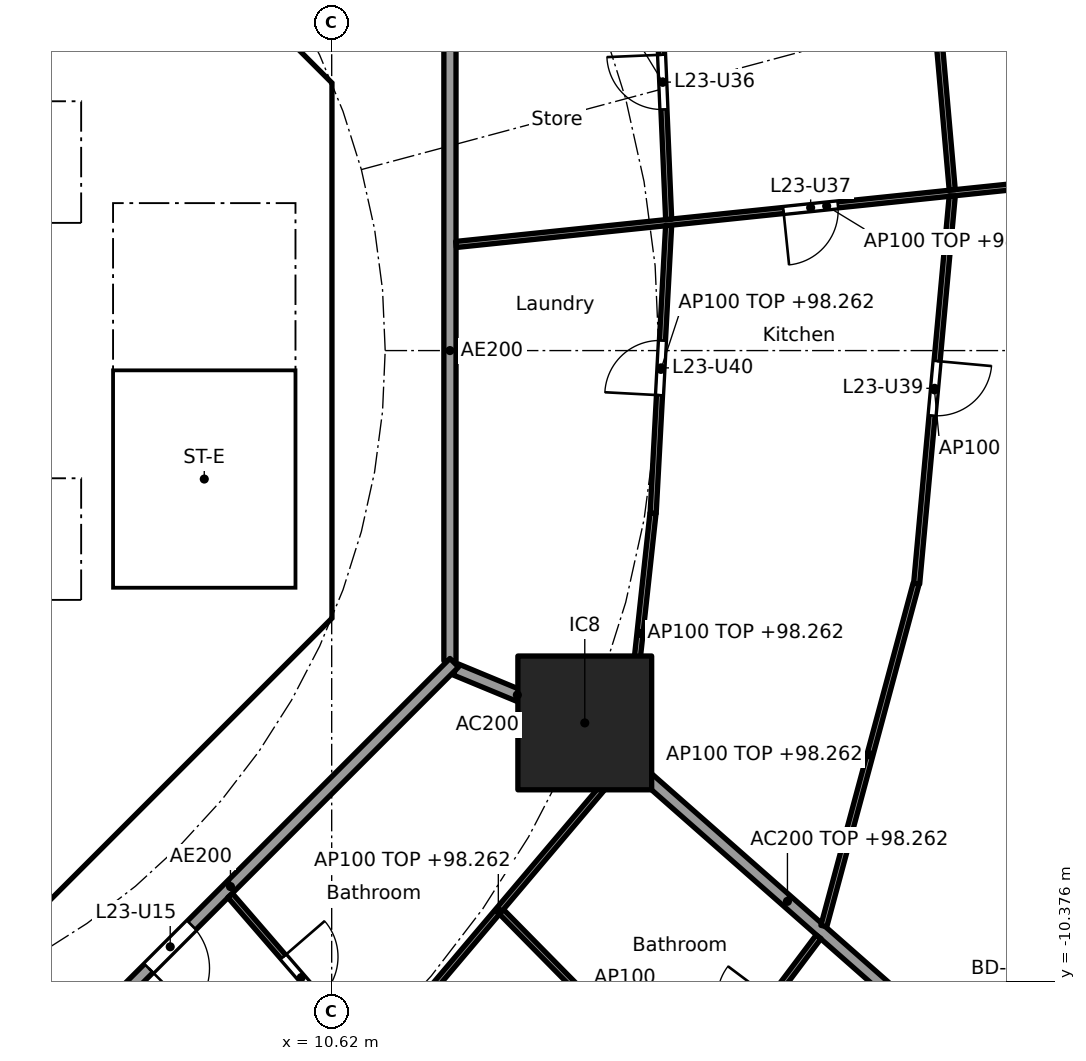
"""IFC4 building model, lengths in metres.
Left out: names, types, materials, properties, quantities, classifications, styles, units other than length and angle.
Written with IfcOpenShell. Run it as: python <this file> out.ifc"""

import sys

from ifc_helpers import new_model, si_unit, direction, frame, frame_2d, origin, origin_2d, place, context, subcontext, project, spatial, polyline, rectangle, outline, extrude, element, fill, save


model = new_model("IFC4")
c1 = context("Model", 3, precision=1e-05, world=origin(), true_north=direction((0.0, 1.0)))
c2 = subcontext(c1, "Body", "Model", "MODEL_VIEW")
j1 = project(units=[si_unit("LENGTHUNIT", "METRE"), si_unit("PLANEANGLEUNIT", "RADIAN")], contexts=[c1])
p1 = place(None, origin())
s1 = spatial("IfcSite", under=j1, at=p1, CompositionType="ELEMENT")
p2 = place(p1, origin())
s2 = spatial("IfcBuilding", under=s1, at=p2, CompositionType="ELEMENT")
p3 = place(p2, frame((0.0, 0.0, 95.5)))
s3 = spatial("IfcBuildingStorey", under=s2, at=p3, CompositionType="ELEMENT", Elevation=95.5)
p4 = place(p3, frame((14.782, -6.123, 0.0), z_axis=(0.0, 0.0, 1.0), x_axis=(1.0, 0.0, 0.0)))
e1 = element("IfcColumn", 1, at=p4, inside=s3, PredefinedType="COLUMN", context=c2, shape_type="SweptSolid", body=[
    extrude(rectangle(XDim=2.2, YDim=2.2, at=origin_2d()), origin(), (0.0, 0.0, 1.0), 3.7),
])
p5 = place(p3, frame((9.988, 4.613, 0.0), z_axis=(0.0, 0.0, 1.0), x_axis=(-0.707106781187, 0.707106781187, 0.0)))
e2 = element("IfcWall", 2, at=p5, inside=s3, PredefinedType="SHEAR", context=c2, shape_type="SweptSolid", body=[
    extrude(rectangle(XDim=7.602, YDim=0.6, at=frame_2d((3.801, 0.0))), origin(), (0.0, 0.0, 1.0), 3.44),
])
p6 = place(p5, frame((3.201, 0.0, 0.0)))
e3 = element("IfcOpeningElement", 3, at=p6, cuts=e2, PredefinedType="OPENING", context=c2, shape_type="SweptSolid", body=[
    extrude(rectangle(XDim=1.2, YDim=2.1, at=frame_2d((0.6, 1.05))), frame((0.0, 0.31, 0.0), z_axis=(0.0, -1.0, 0.0), x_axis=(1.0, 0.0, 0.0)), (0.0, 0.0, 1.0), 0.62),
])
p7 = place(p3, frame((4.613, -9.988, 0.0), z_axis=(0.0, 0.0, 1.0), x_axis=(0.707106781187, 0.707106781187, 0.0)))
e4 = element("IfcWall", 4, at=p7, inside=s3, PredefinedType="SHEAR", context=c2, shape_type="SweptSolid", body=[
    extrude(rectangle(XDim=7.602, YDim=0.6, at=frame_2d((3.801, 0.0))), origin(), (0.0, 0.0, 1.0), 3.44),
])
p8 = place(p7, frame((3.201, 0.0, 0.0)))
e5 = element("IfcOpeningElement", 5, at=p8, cuts=e4, PredefinedType="OPENING", context=c2, shape_type="SweptSolid", body=[
    extrude(rectangle(XDim=1.2, YDim=2.1, at=frame_2d((0.6, 1.05))), frame((0.0, 0.31, 0.0), z_axis=(0.0, -1.0, 0.0), x_axis=(1.0, 0.0, 0.0)), (0.0, 0.0, 1.0), 0.62),
])
p9 = place(p3, frame((-6.7, 2.0, 0.0), z_axis=(0.0, 0.0, 1.0), x_axis=(1.0, 0.0, 0.0)))
e6 = element("IfcWall", 6, at=p9, inside=s3, PredefinedType="SOLIDWALL", context=c2, shape_type="SweptSolid", body=[
    extrude(rectangle(XDim=13.4, YDim=0.2, at=frame_2d((6.7, 0.0))), origin(), (0.0, 0.0, 1.0), 3.44),
])
p10 = place(p9, frame((0.65, 0.0, 0.0)))
e7 = element("IfcOpeningElement", 7, at=p10, cuts=e6, PredefinedType="OPENING", context=c2, shape_type="SweptSolid", body=[
    extrude(rectangle(XDim=1.1, YDim=2.1, at=frame_2d((0.55, 1.05))), frame((0.0, 0.11, 0.0), z_axis=(0.0, -1.0, 0.0), x_axis=(1.0, 0.0, 0.0)), (0.0, 0.0, 1.0), 0.22),
])
p11 = place(p9, frame((2.85, 0.0, 0.0)))
e8 = element("IfcOpeningElement", 8, at=p11, cuts=e6, PredefinedType="OPENING", context=c2, shape_type="SweptSolid", body=[
    extrude(rectangle(XDim=1.1, YDim=2.1, at=frame_2d((0.55, 1.05))), frame((0.0, 0.11, 0.0), z_axis=(0.0, -1.0, 0.0), x_axis=(1.0, 0.0, 0.0)), (0.0, 0.0, 1.0), 0.22),
])
p12 = place(p9, frame((5.05, 0.0, 0.0)))
e9 = element("IfcOpeningElement", 9, at=p12, cuts=e6, PredefinedType="OPENING", context=c2, shape_type="SweptSolid", body=[
    extrude(rectangle(XDim=1.1, YDim=2.1, at=frame_2d((0.55, 1.05))), frame((0.0, 0.11, 0.0), z_axis=(0.0, -1.0, 0.0), x_axis=(1.0, 0.0, 0.0)), (0.0, 0.0, 1.0), 0.22),
])
p13 = place(p3, frame((6.7, 4.0, 0.0), z_axis=(0.0, 0.0, 1.0), x_axis=(1.0, 0.0, 0.0)))
e10 = element("IfcWall", 10, at=p13, inside=s3, PredefinedType="SOLIDWALL", context=c2, shape_type="SweptSolid", body=[
    extrude(rectangle(XDim=3.325, YDim=0.2, at=frame_2d((1.662, 0.0))), origin(), (0.0, 0.0, 1.0), 3.44),
])
p14 = place(p13, frame((1.25, 0.0, 0.0)))
e11 = element("IfcOpeningElement", 11, at=p14, cuts=e10, PredefinedType="OPENING", context=c2, shape_type="SweptSolid", body=[
    extrude(rectangle(XDim=1.1, YDim=2.1, at=frame_2d((0.55, 1.05))), frame((0.0, 0.11, 0.0), z_axis=(0.0, -1.0, 0.0), x_axis=(1.0, 0.0, 0.0)), (0.0, 0.0, 1.0), 0.22),
])
p15 = place(p3, frame((-6.7, -2.0, 0.0), z_axis=(0.0, 0.0, 1.0), x_axis=(1.0, 0.0, 0.0)))
e12 = element("IfcWall", 12, at=p15, inside=s3, PredefinedType="SOLIDWALL", context=c2, shape_type="SweptSolid", body=[
    extrude(rectangle(XDim=13.4, YDim=0.2, at=frame_2d((6.7, 0.0))), origin(), (0.0, 0.0, 1.0), 3.44),
])
p16 = place(p15, frame((0.65, 0.0, 0.0)))
e13 = element("IfcOpeningElement", 13, at=p16, cuts=e12, PredefinedType="OPENING", context=c2, shape_type="SweptSolid", body=[
    extrude(rectangle(XDim=1.1, YDim=2.1, at=frame_2d((0.55, 1.05))), frame((0.0, 0.11, 0.0), z_axis=(0.0, -1.0, 0.0), x_axis=(1.0, 0.0, 0.0)), (0.0, 0.0, 1.0), 0.22),
])
p17 = place(p15, frame((2.85, 0.0, 0.0)))
e14 = element("IfcOpeningElement", 14, at=p17, cuts=e12, PredefinedType="OPENING", context=c2, shape_type="SweptSolid", body=[
    extrude(rectangle(XDim=1.1, YDim=2.1, at=frame_2d((0.55, 1.05))), frame((0.0, 0.11, 0.0), z_axis=(0.0, -1.0, 0.0), x_axis=(1.0, 0.0, 0.0)), (0.0, 0.0, 1.0), 0.22),
])
p18 = place(p3, origin())
e15 = element("IfcWall", 15, at=p18, inside=s3, PredefinedType="SHEAR", context=c2, shape_type="SweptSolid", body=[
    extrude(outline(polyline([(9.776, -4.401), (10.025, -4.152), (10.025, -3.801), (10.025, 4.152), (9.776, 4.401), (10.2, 4.825), (10.625, 4.401), (10.625, -4.401), (10.2, -4.825), (9.776, -4.401)])), origin(), (0.0, 0.0, 1.0), 3.44),
])
p19 = place(p3, origin())
e16 = element("IfcWall", 16, at=p19, inside=s3, PredefinedType="SOLIDWALL", context=c2, shape_type="SweptSolid", body=[
    extrude(outline(polyline([(-6.7, -2.1), (-6.5, -2.1), (-6.5, -4.1), (-4.5, -4.1), (-4.5, -2.1), (-4.3, -2.1), (-4.3, -4.1), (-2.3, -4.1), (-2.3, -2.1), (-2.1, -2.1), (-2.1, -4.1), (-0.1, -4.1), (-0.1, -2.1), (0.1, -2.1), (0.1, -4.1), (2.1, -4.1), (2.1, -2.1), (2.3, -2.1), (2.3, -4.1), (4.3, -4.1), (4.3, -2.1), (4.5, -2.1), (4.5, -4.1), (6.5, -4.1), (6.5, -2.1), (6.7, -2.1), (6.7, -4.3), (-6.7, -4.3), (-6.7, -2.1)])), origin(), (0.0, 0.0, 1.0), 3.44),
])
p20 = place(p3, origin())
e17 = element("IfcWall", 17, at=p20, inside=s3, PredefinedType="SOLIDWALL", context=c2, shape_type="SweptSolid", body=[
    extrude(outline(polyline([(-6.5, 2.1), (-6.7, 2.1), (-6.7, 4.3), (6.7, 4.3), (6.7, 2.1), (6.5, 2.1), (6.5, 4.1), (4.5, 4.1), (4.5, 2.1), (4.3, 2.1), (4.3, 4.1), (2.3, 4.1), (2.3, 2.1), (2.1, 2.1), (2.1, 4.1), (0.1, 4.1), (0.1, 2.1), (-0.1, 2.1), (-0.1, 4.1), (-2.1, 4.1), (-2.1, 2.1), (-2.3, 2.1), (-2.3, 4.1), (-4.3, 4.1), (-4.3, 2.1), (-4.5, 2.1), (-4.5, 4.1), (-6.5, 4.1), (-6.5, 2.1)])), origin(), (0.0, 0.0, 1.0), 3.44),
])
p21 = place(p3, origin())
e18 = element("IfcWall", 18, at=p21, inside=s3, PredefinedType="SOLIDWALL", context=c2, shape_type="SweptSolid", body=[
    extrude(outline(polyline([(7.025, -3.9), (6.7, -3.9), (6.7, 3.9), (7.025, 3.9), (7.025, -3.9)])), origin(), (0.0, 0.0, 1.0), 3.44),
])
p22 = place(p3, origin())
e19 = element("IfcWall", 19, at=p22, inside=s3, PredefinedType="SOLIDWALL", context=c2, shape_type="SweptSolid", body=[
    extrude(outline(polyline([(10.025, -4.1), (6.7, -4.1), (6.7, -3.9), (10.025, -3.9), (10.025, -4.1)])), origin(), (0.0, 0.0, 1.0), 3.44),
])
p23 = place(p3, frame((12.657, -5.243, 0.0), z_axis=(0.0, 0.0, 1.0), x_axis=(0.923876145736, -0.382691608661, 0.0)))
e20 = element("IfcWall", 20, at=p23, inside=s3, PredefinedType="PARTITIONING", context=c2, shape_type="SweptSolid", body=[
    extrude(rectangle(XDim=2.2, YDim=0.2, at=frame_2d((1.1, 0.0))), origin(), (0.0, 0.0, 1.0), 3.44),
])
p24 = place(p3, frame((14.82, -6.156, 0.0), z_axis=(0.0, 0.0, 1.0), x_axis=(0.750582231659, -0.660777052808, 0.0)))
e21 = element("IfcWall", 21, at=p24, inside=s3, PredefinedType="PARTITIONING", context=c2, shape_type="SweptSolid", body=[
    extrude(rectangle(XDim=8.781, YDim=0.2, at=frame_2d((4.391, 0.0))), origin(), (0.0, 0.0, 1.0), 2.762),
])
p25 = place(p3, frame((12.565, -5.104, 0.0), z_axis=(0.0, 0.0, 1.0), x_axis=(0.0, 1.0, 0.0)))
e22 = element("IfcWall", 22, at=p25, inside=s3, PredefinedType="PARTITIONING", context=c2, shape_type="SweptSolid", body=[
    extrude(rectangle(XDim=10.209, YDim=0.2, at=frame_2d((5.104, 0.0))), origin(), (0.0, 0.0, 1.0), 3.44),
])
p26 = place(p3, frame((5.275, -12.494, 0.0), z_axis=(0.0, 0.0, 1.0), x_axis=(0.707106781187, 0.707106781187, 0.0)))
e23 = element("IfcWall", 23, at=p26, inside=s3, PredefinedType="PARTITIONING", context=c2, shape_type="SweptSolid", body=[
    extrude(rectangle(XDim=10.409, YDim=0.2, at=frame_2d((5.205, 0.0))), origin(), (0.0, 0.0, 1.0), 3.44),
])
p27 = place(p26, frame((3.303, 0.0, 0.0)))
e24 = element("IfcOpeningElement", 24, at=p27, cuts=e23, PredefinedType="OPENING", context=c2, shape_type="SweptSolid", body=[
    extrude(rectangle(XDim=1.0, YDim=2.1, at=frame_2d((0.5, 1.05))), frame((0.0, 0.11, 0.0), z_axis=(0.0, -1.0, 0.0), x_axis=(1.0, 0.0, 0.0)), (0.0, 0.0, 1.0), 0.22),
])
p28 = place(p3, frame((12.664, 1.745, 0.0), z_axis=(0.0, 0.0, 1.0), x_axis=(0.994662790212, 0.103179134358, 0.0)))
e25 = element("IfcWall", 25, at=p28, inside=s3, PredefinedType="PARTITIONING", context=c2, shape_type="SweptSolid", body=[
    extrude(rectangle(XDim=12.257, YDim=0.1, at=frame_2d((6.128, 0.0))), origin(), (0.0, 0.0, 1.0), 2.687),
])
p29 = place(p28, frame((5.414, 0.0, 0.0)))
e26 = element("IfcOpeningElement", 26, at=p29, cuts=e25, PredefinedType="OPENING", context=c2, shape_type="SweptSolid", body=[
    extrude(rectangle(XDim=0.9, YDim=2.1, at=frame_2d((0.45, 1.05))), frame((0.0, 0.06, 0.0), z_axis=(0.0, -1.0, 0.0), x_axis=(1.0, 0.0, 0.0)), (0.0, 0.0, 1.0), 0.12),
])
p30 = place(p3, frame((16.162, 2.158, 0.0), z_axis=(0.0, 0.0, 1.0), x_axis=(-0.043120653248, 0.999069872063, 0.0)))
e27 = element("IfcWall", 27, at=p30, inside=s3, PredefinedType="PARTITIONING", context=c2, shape_type="SweptSolid", body=[
    extrude(rectangle(XDim=4.518, YDim=0.1, at=frame_2d((2.259, 0.0))), origin(), (0.0, 0.0, 1.0), 3.44),
])
p31 = place(p30, frame((1.809, 0.0, 0.0)))
e28 = element("IfcOpeningElement", 28, at=p31, cuts=e27, PredefinedType="OPENING", context=c2, shape_type="SweptSolid", body=[
    extrude(rectangle(XDim=0.9, YDim=2.1, at=frame_2d((0.45, 1.05))), frame((0.0, 0.06, 0.0), z_axis=(0.0, -1.0, 0.0), x_axis=(1.0, 0.0, 0.0)), (0.0, 0.0, 1.0), 0.12),
])
p32 = place(p3, frame((16.161, 2.058, 0.0), z_axis=(0.0, 0.0, 1.0), x_axis=(-0.053696394729, -0.998557307916, 0.0)))
e29 = element("IfcWall", 29, at=p32, inside=s3, PredefinedType="PARTITIONING", context=c2, shape_type="SweptSolid", body=[
    extrude(rectangle(XDim=4.742, YDim=0.1, at=frame_2d((2.371, 0.0))), origin(), (0.0, 0.0, 1.0), 2.762),
])
p33 = place(p32, frame((1.896, 0.0, 0.0)))
e30 = element("IfcOpeningElement", 30, at=p33, cuts=e29, PredefinedType="OPENING", context=c2, shape_type="SweptSolid", body=[
    extrude(rectangle(XDim=0.9, YDim=2.1, at=frame_2d((0.45, 1.05))), frame((0.0, 0.06, 0.0), z_axis=(0.0, -1.0, 0.0), x_axis=(1.0, 0.0, 0.0)), (0.0, 0.0, 1.0), 0.12),
])
p34 = place(p3, frame((20.825, 2.642, 0.0), z_axis=(0.0, 0.0, 1.0), x_axis=(-0.08776338161, 0.996141349834, 0.0)))
e31 = element("IfcWall", 31, at=p34, inside=s3, PredefinedType="PARTITIONING", context=c2, shape_type="SweptSolid", body=[
    extrude(rectangle(XDim=6.337, YDim=0.1, at=frame_2d((3.168, 0.0))), origin(), (0.0, 0.0, 1.0), 2.762),
])
p35 = place(p34, frame((2.694, 0.0, 0.0)))
e32 = element("IfcOpeningElement", 32, at=p35, cuts=e31, PredefinedType="OPENING", context=c2, shape_type="SweptSolid", body=[
    extrude(rectangle(XDim=0.9, YDim=2.1, at=frame_2d((0.45, 1.05))), frame((0.0, 0.06, 0.0), z_axis=(0.0, -1.0, 0.0), x_axis=(1.0, 0.0, 0.0)), (0.0, 0.0, 1.0), 0.12),
])
p36 = place(p3, frame((20.825, 2.542, 0.0), z_axis=(0.0, 0.0, 1.0), x_axis=(-0.09140211812, -0.995814065377, 0.0)))
e33 = element("IfcWall", 33, at=p36, inside=s3, PredefinedType="PARTITIONING", context=c2, shape_type="SweptSolid", body=[
    extrude(rectangle(XDim=6.403, YDim=0.1, at=frame_2d((3.201, 0.0))), origin(), (0.0, 0.0, 1.0), 2.762),
])
p37 = place(p36, frame((2.726, 0.0, 0.0)))
e34 = element("IfcOpeningElement", 34, at=p37, cuts=e33, PredefinedType="OPENING", context=c2, shape_type="SweptSolid", body=[
    extrude(rectangle(XDim=0.9, YDim=2.1, at=frame_2d((0.45, 1.05))), frame((0.0, 0.06, 0.0), z_axis=(0.0, -1.0, 0.0), x_axis=(1.0, 0.0, 0.0)), (0.0, 0.0, 1.0), 0.12),
])
p38 = place(p3, frame((8.95, -8.96, 0.0), z_axis=(0.0, 0.0, 1.0), x_axis=(0.65441081073, -0.756139200676, 0.0)))
e35 = element("IfcWall", 35, at=p38, inside=s3, PredefinedType="PARTITIONING", context=c2, shape_type="SweptSolid", body=[
    extrude(rectangle(XDim=12.451, YDim=0.1, at=frame_2d((6.226, 0.0))), origin(), (0.0, 0.0, 1.0), 2.687),
])
p39 = place(p38, frame((1.336, 0.0, 0.0)))
e36 = element("IfcOpeningElement", 36, at=p39, cuts=e35, PredefinedType="OPENING", context=c2, shape_type="SweptSolid", body=[
    extrude(rectangle(XDim=0.9, YDim=2.1, at=frame_2d((0.45, 1.05))), frame((0.0, 0.06, 0.0), z_axis=(0.0, -1.0, 0.0), x_axis=(1.0, 0.0, 0.0)), (0.0, 0.0, 1.0), 0.12),
])
p40 = place(p38, frame((5.501, 0.0, 0.0)))
e37 = element("IfcOpeningElement", 37, at=p40, cuts=e35, PredefinedType="OPENING", context=c2, shape_type="SweptSolid", body=[
    extrude(rectangle(XDim=0.9, YDim=2.1, at=frame_2d((0.45, 1.05))), frame((0.0, 0.06, 0.0), z_axis=(0.0, -1.0, 0.0), x_axis=(1.0, 0.0, 0.0)), (0.0, 0.0, 1.0), 0.12),
])
p41 = place(p38, frame((9.941, 0.0, 0.0)))
e38 = element("IfcOpeningElement", 38, at=p41, cuts=e35, PredefinedType="OPENING", context=c2, shape_type="SweptSolid", body=[
    extrude(rectangle(XDim=0.9, YDim=2.1, at=frame_2d((0.45, 1.05))), frame((0.0, 0.06, 0.0), z_axis=(0.0, -1.0, 0.0), x_axis=(1.0, 0.0, 0.0)), (0.0, 0.0, 1.0), 0.12),
])
p42 = place(p3, frame((11.32, -11.623, 0.0), z_axis=(0.0, 0.0, 1.0), x_axis=(0.646106810963, 0.763247003811, 0.0)))
e39 = element("IfcWall", 39, at=p42, inside=s3, PredefinedType="PARTITIONING", context=c2, shape_type="SweptSolid", body=[
    extrude(rectangle(XDim=6.317, YDim=0.1, at=frame_2d((3.159, 0.0))), origin(), (0.0, 0.0, 1.0), 2.762),
])
p43 = place(p3, frame((14.432, -15.219, 0.0), z_axis=(0.0, 0.0, 1.0), x_axis=(0.601001256685, 0.799248077548, 0.0)))
e40 = element("IfcWall", 40, at=p43, inside=s3, PredefinedType="PARTITIONING", context=c2, shape_type="SweptSolid", body=[
    extrude(rectangle(XDim=6.98, YDim=0.1, at=frame_2d((3.49, 0.0))), origin(), (0.0, 0.0, 1.0), 2.762),
])
p44 = place(p43, frame((4.798, 0.0, 0.0)))
e41 = element("IfcOpeningElement", 41, at=p44, cuts=e40, PredefinedType="OPENING", context=c2, shape_type="SweptSolid", body=[
    extrude(rectangle(XDim=0.9, YDim=2.1, at=frame_2d((0.45, 1.05))), frame((0.0, 0.06, 0.0), z_axis=(0.0, -1.0, 0.0), x_axis=(1.0, 0.0, 0.0)), (0.0, 0.0, 1.0), 0.12),
])
p45 = place(p3, frame((13.412, -9.229, 0.0), z_axis=(0.0, 0.0, 1.0), x_axis=(0.701611164285, -0.712560014421, 0.0)))
e42 = element("IfcWall", 42, at=p45, inside=s3, PredefinedType="PARTITIONING", context=c2, shape_type="SweptSolid", body=[
    extrude(rectangle(XDim=4.415, YDim=0.1, at=frame_2d((2.208, 0.0))), origin(), (0.0, 0.0, 1.0), 3.44),
])
p46 = place(p3, frame((15.477, -6.625, 0.0), z_axis=(0.0, 0.0, 1.0), x_axis=(0.107570517496, 0.994197457131, 0.0)))
e43 = element("IfcWall", 43, at=p46, inside=s3, PredefinedType="PARTITIONING", context=c2, shape_type="SweptSolid", body=[
    extrude(rectangle(XDim=3.972, YDim=0.1, at=frame_2d((1.986, 0.0))), origin(), (0.0, 0.0, 1.0), 2.762),
])
p47 = place(p3, frame((18.713, -9.464, 0.0), z_axis=(0.0, 0.0, 1.0), x_axis=(0.260279646259, 0.965533275316, 0.0)))
e44 = element("IfcWall", 44, at=p47, inside=s3, PredefinedType="PARTITIONING", context=c2, shape_type="SweptSolid", body=[
    extrude(rectangle(XDim=5.833, YDim=0.1, at=frame_2d((2.917, 0.0))), origin(), (0.0, 0.0, 1.0), 2.762),
])
p48 = place(p14, frame((1.1, 0.0, 0.0), x_axis=(-1.0, 0.0, 0.0)))
e45 = element("IfcDoor", 45, at=p48, inside=s3, OperationType="SINGLE_SWING_LEFT", PredefinedType="DOOR", context=c2, shape_type="SweptSolid", body=[
    extrude(rectangle(XDim=1.1, YDim=2.1, at=frame_2d((0.55, 1.05))), frame((0.0, 0.025, 0.0), z_axis=(0.0, -1.0, 0.0), x_axis=(1.0, 0.0, 0.0)), (0.0, 0.0, 1.0), 0.05),
])
fill(e11, e45)
p49 = place(p8, origin())
e46 = element("IfcDoor", 46, at=p49, inside=s3, OperationType="SINGLE_SWING_RIGHT", PredefinedType="DOOR", context=c2, shape_type="SweptSolid", body=[
    extrude(rectangle(XDim=1.2, YDim=2.1, at=frame_2d((0.6, 1.05))), frame((0.0, 0.025, 0.0), z_axis=(0.0, -1.0, 0.0), x_axis=(1.0, 0.0, 0.0)), (0.0, 0.0, 1.0), 0.05),
])
fill(e5, e46)
p50 = place(p27, frame((1.0, 0.0, 0.0), x_axis=(-1.0, 0.0, 0.0)))
e47 = element("IfcDoor", 47, at=p50, inside=s3, OperationType="SINGLE_SWING_RIGHT", PredefinedType="DOOR", context=c2, shape_type="SweptSolid", body=[
    extrude(rectangle(XDim=1.0, YDim=2.1, at=frame_2d((0.5, 1.05))), frame((0.0, 0.025, 0.0), z_axis=(0.0, -1.0, 0.0), x_axis=(1.0, 0.0, 0.0)), (0.0, 0.0, 1.0), 0.05),
])
fill(e24, e47)
p51 = place(p39, origin())
e48 = element("IfcDoor", 48, at=p51, inside=s3, OperationType="SINGLE_SWING_LEFT", PredefinedType="DOOR", context=c2, shape_type="SweptSolid", body=[
    extrude(rectangle(XDim=0.9, YDim=2.1, at=frame_2d((0.45, 1.05))), frame((0.0, 0.025, 0.0), z_axis=(0.0, -1.0, 0.0), x_axis=(1.0, 0.0, 0.0)), (0.0, 0.0, 1.0), 0.05),
])
fill(e36, e48)
p52 = place(p31, origin())
e49 = element("IfcDoor", 49, at=p52, inside=s3, OperationType="SINGLE_SWING_RIGHT", PredefinedType="DOOR", context=c2, shape_type="SweptSolid", body=[
    extrude(rectangle(XDim=0.9, YDim=2.1, at=frame_2d((0.45, 1.05))), frame((0.0, 0.025, 0.0), z_axis=(0.0, -1.0, 0.0), x_axis=(1.0, 0.0, 0.0)), (0.0, 0.0, 1.0), 0.05),
])
fill(e28, e49)
p53 = place(p29, frame((0.9, 0.0, 0.0), x_axis=(-1.0, 0.0, 0.0)))
e50 = element("IfcDoor", 50, at=p53, inside=s3, OperationType="SINGLE_SWING_RIGHT", PredefinedType="DOOR", context=c2, shape_type="SweptSolid", body=[
    extrude(rectangle(XDim=0.9, YDim=2.1, at=frame_2d((0.45, 1.05))), frame((0.0, 0.025, 0.0), z_axis=(0.0, -1.0, 0.0), x_axis=(1.0, 0.0, 0.0)), (0.0, 0.0, 1.0), 0.05),
])
fill(e26, e50)
p54 = place(p37, origin())
e51 = element("IfcDoor", 51, at=p54, inside=s3, OperationType="SINGLE_SWING_LEFT", PredefinedType="DOOR", context=c2, shape_type="SweptSolid", body=[
    extrude(rectangle(XDim=0.9, YDim=2.1, at=frame_2d((0.45, 1.05))), frame((0.0, 0.025, 0.0), z_axis=(0.0, -1.0, 0.0), x_axis=(1.0, 0.0, 0.0)), (0.0, 0.0, 1.0), 0.05),
])
fill(e34, e51)
p55 = place(p33, frame((0.9, 0.0, 0.0), x_axis=(-1.0, 0.0, 0.0)))
e52 = element("IfcDoor", 52, at=p55, inside=s3, OperationType="SINGLE_SWING_LEFT", PredefinedType="DOOR", context=c2, shape_type="SweptSolid", body=[
    extrude(rectangle(XDim=0.9, YDim=2.1, at=frame_2d((0.45, 1.05))), frame((0.0, 0.025, 0.0), z_axis=(0.0, -1.0, 0.0), x_axis=(1.0, 0.0, 0.0)), (0.0, 0.0, 1.0), 0.05),
])
fill(e30, e52)
save(model, sys.argv[1])
